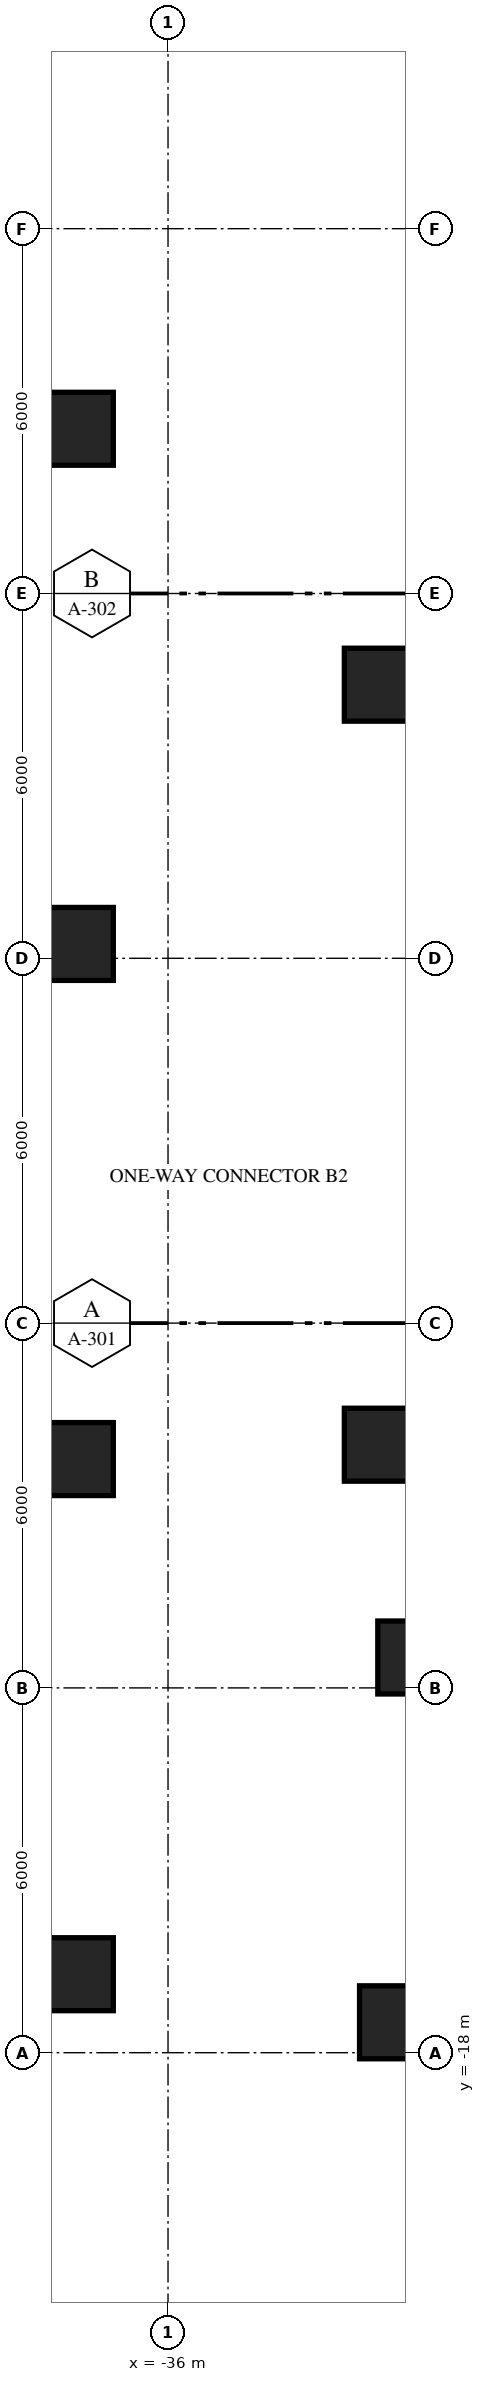
"""IFC4 building model, lengths in metres.
Left out: names, types, materials, properties, quantities, classifications, styles, units other than length and angle.
Written with IfcOpenShell. Run it as: python <this file> out.ifc"""

import sys

from ifc_helpers import new_model, si_unit, direction, frame, origin, origin_2d, place, context, subcontext, project, spatial, rectangle, extrude, element, save


model = new_model("IFC4")
c1 = context("Model", 3, precision=1e-05, world=origin(), true_north=direction((0.0, 1.0)))
c2 = subcontext(c1, "Body", "Model", "MODEL_VIEW")
j1 = project(units=[si_unit("LENGTHUNIT", "METRE"), si_unit("PLANEANGLEUNIT", "RADIAN")], contexts=[c1])
p1 = place(None, origin())
s1 = spatial("IfcSite", under=j1, at=p1, CompositionType="ELEMENT")
p2 = place(p1, origin())
s2 = spatial("IfcBuilding", under=s1, at=p2, CompositionType="ELEMENT")
p3 = place(p2, frame((0.0, 0.0, -8.4)))
s3 = spatial("IfcBuildingStorey", under=s2, at=p3, CompositionType="ELEMENT", Elevation=-8.4)
for number, where, z_axis, x_axis in (
    (1, (-32.25, -17.5, 0.0), (0.0, 0.0, 1.0), (1.0, 0.0, 0.0)),
    (2, (-37.5, -16.709, 0.0), (0.0, 0.0, 1.0), (1.0, 0.0, 0.0)),
    (3, (-31.95, -11.5, 0.0), (0.0, 0.0, 1.0), (1.0, 0.0, 0.0)),
    (4, (-37.5, -8.236, 0.0), (0.0, 0.0, 1.0), (1.0, 0.0, 0.0)),
    (5, (-32.5, -8.0, 0.0), (0.0, 0.0, 1.0), (1.0, 0.0, 0.0)),
    (6, (-37.5, 0.236, 0.0), (0.0, 0.0, 1.0), (1.0, 0.0, 0.0)),
    (7, (-32.5, 4.5, 0.0), (0.0, 0.0, 1.0), (1.0, 0.0, 0.0)),
    (8, (-37.5, 8.709, 0.0), (0.0, 0.0, 1.0), (1.0, 0.0, 0.0)),
):
    element("IfcColumn", number, at=place(p3, frame(where, z_axis=z_axis, x_axis=x_axis)), inside=s3, PredefinedType="COLUMN", context=c2, shape_type="SweptSolid", body=[
        extrude(rectangle(XDim=1.2, YDim=1.2, at=origin_2d()), origin(), (0.0, 0.0, 1.0), 4.2),
    ])
save(model, sys.argv[1])
